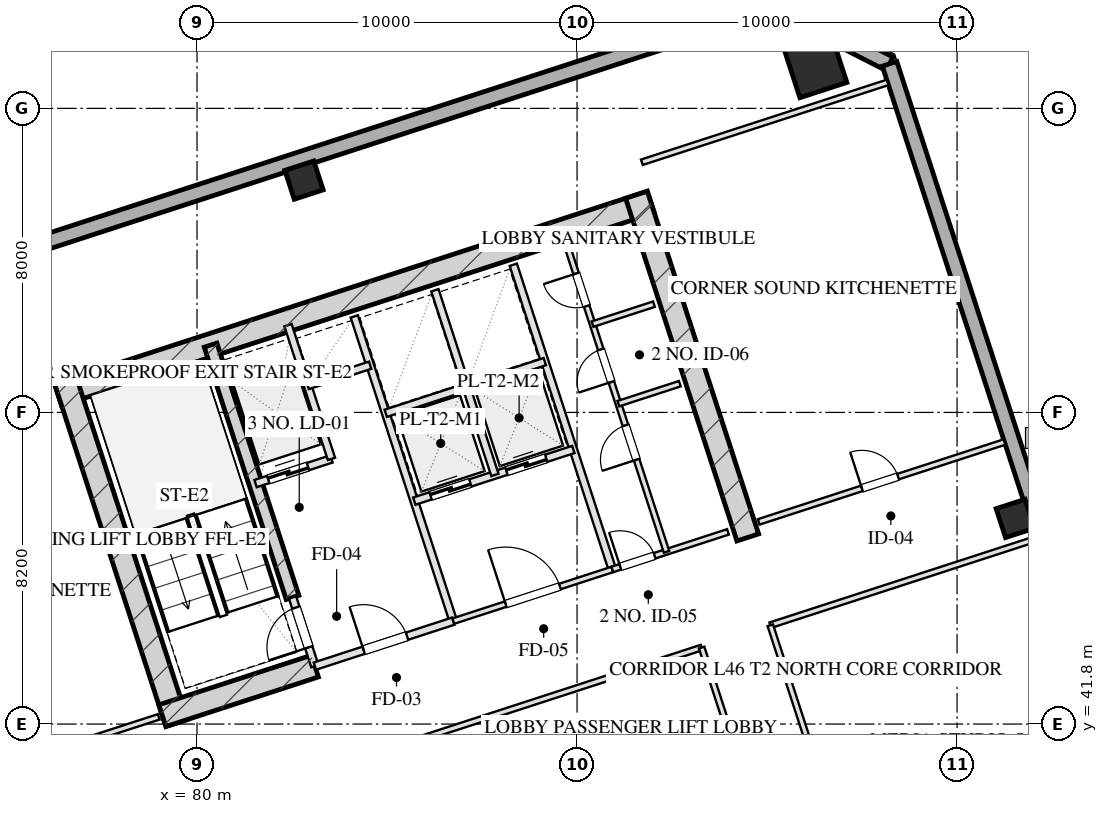
"""IFC4 building model, lengths in metres.
Left out: names, types, materials, properties, quantities, classifications, styles, units other than length and angle.
Written with IfcOpenShell. Run it as: python <this file> out.ifc"""

import sys

from ifc_helpers import new_model, si_unit, direction, frame, frame_2d, origin, origin_2d, place, context, subcontext, project, spatial, rectangle, hollow_rectangle, extrude, element, fill, save


model = new_model("IFC4")
c1 = context("Model", 3, precision=1e-05, world=origin(), true_north=direction((0.0, 1.0)))
c2 = subcontext(c1, "Body", "Model", "MODEL_VIEW")
j1 = project(units=[si_unit("LENGTHUNIT", "METRE"), si_unit("PLANEANGLEUNIT", "RADIAN")], contexts=[c1])
p1 = place(None, origin())
s1 = spatial("IfcSite", under=j1, at=p1, CompositionType="ELEMENT")
p2 = place(p1, origin())
s2 = spatial("IfcBuilding", under=s1, at=p2, CompositionType="ELEMENT")
p3 = place(p2, frame((0.0, 0.0, 173.65)))
s3 = spatial("IfcBuildingStorey", under=s2, at=p3, CompositionType="ELEMENT", Elevation=173.65)
p4 = place(p3, frame((76.344, 50.466, 0.0), z_axis=(0.0, 0.0, 1.0), x_axis=(0.951055727519, 0.309019421968, 0.0)))
e1 = element("IfcWall", 1, at=p4, inside=s3, PredefinedType="SHEAR", context=c2, shape_type="SweptSolid", body=[
    extrude(rectangle(XDim=16.4, YDim=0.6, at=frame_2d((8.2, 0.0))), origin(), (0.0, 0.0, 1.0), 3.45),
])
for number, where, z_axis, x_axis in (
    (2, (79.466, 41.828, 0.0), (0.0, 0.0, 1.0), (-0.309, 0.951, 0.0)),
    (3, (94.492, 46.71, 0.0), (0.0, 0.0, 1.0), (-0.309, 0.951, 0.0)),
):
    element("IfcWall", number, at=place(p3, frame(where, z_axis=z_axis, x_axis=x_axis)), inside=s3, PredefinedType="SHEAR", context=c2, shape_type="SweptSolid", body=[
        extrude(rectangle(XDim=9.48, YDim=0.6, at=frame_2d((4.74, 0.0))), origin(), (0.0, 0.0, 1.0), 3.45),
    ])
p5 = place(p3, frame((82.514, 45.131, 0.0), z_axis=(0.0, 0.0, 1.0), x_axis=(-0.308988790936, 0.951065679686, 0.0)))
e4 = element("IfcWall", 4, at=p5, inside=s3, PredefinedType="SHEAR", context=c2, shape_type="SweptSolid", body=[
    extrude(rectangle(XDim=6.98, YDim=0.35, at=frame_2d((3.49, 0.0))), origin(), (0.0, 0.0, 1.0), 3.45),
])
p6 = place(p3, frame((79.087, 42.021, 0.0), z_axis=(0.0, 0.0, 1.0), x_axis=(0.951062550203, 0.3089984233, 0.0)))
e5 = element("IfcWall", 5, at=p6, inside=s3, PredefinedType="SHEAR", context=c2, shape_type="SweptSolid", body=[
    extrude(rectangle(XDim=4.22, YDim=0.6, at=frame_2d((2.11, 0.0))), origin(), (0.0, 0.0, 1.0), 3.45),
])
p7 = place(p3, frame((96.281, 59.099, 0.0), z_axis=(0.0, 0.0, 1.0), x_axis=(0.951056516295, 0.309016994375, 0.0)))
e6 = element("IfcColumn", 6, at=p7, inside=s3, PredefinedType="COLUMN", context=c2, shape_type="SweptSolid", body=[
    extrude(hollow_rectangle(XDim=1.3, YDim=1.3, WallThickness=0.045, at=origin_2d()), origin(), (0.0, 0.0, 1.0), 3.451),
])
for number, where, z_axis, x_axis in (
    (7, (101.532, 47.21, 0.0), (0.0, 0.0, 1.0), (0.951, 0.309, 0.0)),
    (8, (82.815, 56.112, 0.0), (0.0, 0.0, 1.0), (0.951, 0.309, 0.0)),
):
    element("IfcColumn", number, at=place(p3, frame(where, z_axis=z_axis, x_axis=x_axis)), inside=s3, PredefinedType="COLUMN", context=c2, shape_type="SweptSolid", body=[
        extrude(hollow_rectangle(XDim=0.8, YDim=0.8, WallThickness=0.028, at=origin_2d()), origin(), (0.0, 0.0, 1.0), 3.451),
    ])
p8 = place(p3, frame((81.776, 8.827, 0.0), z_axis=(0.0, 0.0, 1.0), x_axis=(-0.309014228706, 0.951057414911, 0.0)))
e9 = element("IfcWall", 9, at=p8, inside=s3, PredefinedType="SOLIDWALL", context=c2, shape_type="SweptSolid", body=[
    extrude(rectangle(XDim=42.8, YDim=0.4, at=frame_2d((21.4, 0.0))), origin(), (0.0, 0.0, 1.0), 2.61),
])
p9 = place(p8, frame((18.25, 0.0, 0.0)))
e10 = element("IfcOpeningElement", 10, at=p9, cuts=e9, PredefinedType="OPENING", context=c2, shape_type="SweptSolid", body=[
    extrude(rectangle(XDim=1.1, YDim=2.15, at=frame_2d((0.55, 1.075))), frame((0.0, 0.21, 0.0), z_axis=(0.0, -1.0, 0.0), x_axis=(1.0, 0.0, 0.0)), (0.0, 0.0, 1.0), 0.42),
])
p10 = place(p3, frame((70.092, 52.556, 0.0), z_axis=(0.0, 0.0, 1.0), x_axis=(0.951057580055, 0.30901372044, 0.0)))
e11 = element("IfcWall", 11, at=p10, inside=s3, PredefinedType="SOLIDWALL", context=c2, shape_type="SweptSolid", body=[
    extrude(rectangle(XDim=26.4, YDim=0.4, at=frame_2d((13.2, 0.0))), origin(), (0.0, 0.0, 1.0), 2.61),
])
p11 = place(p3, frame((95.199, 60.714, 0.0), z_axis=(0.0, 0.0, 1.0), x_axis=(0.891020832027, -0.453962417932, 0.0)))
e12 = element("IfcWall", 12, at=p11, inside=s3, PredefinedType="SOLIDWALL", context=c2, shape_type="SweptSolid", body=[
    extrude(rectangle(XDim=3.394, YDim=0.4, at=frame_2d((1.697, 0.0))), origin(), (0.0, 0.0, 1.0), 2.61),
])
p12 = place(p3, frame((98.224, 59.173, 0.0), z_axis=(0.0, 0.0, 1.0), x_axis=(0.309014228706, -0.951057414911, 0.0)))
e13 = element("IfcWall", 13, at=p12, inside=s3, PredefinedType="SOLIDWALL", context=c2, shape_type="SweptSolid", body=[
    extrude(rectangle(XDim=42.8, YDim=0.4, at=frame_2d((21.4, 0.0))), origin(), (0.0, 0.0, 1.0), 2.61),
])
p13 = place(p12, frame((17.675, 0.0, 0.75)))
e14 = element("IfcOpeningElement", 14, at=p13, cuts=e13, PredefinedType="OPENING", context=c2, shape_type="SweptSolid", body=[
    extrude(rectangle(XDim=2.25, YDim=1.46, at=frame_2d((1.125, 0.73))), frame((0.0, 0.21, 0.0), z_axis=(0.0, -1.0, 0.0), x_axis=(1.0, 0.0, 0.0)), (0.0, 0.0, 1.0), 0.42),
])
p14 = place(p12, frame((13.875, 0.0, 0.75)))
e15 = element("IfcOpeningElement", 15, at=p14, cuts=e13, PredefinedType="OPENING", context=c2, shape_type="SweptSolid", body=[
    extrude(rectangle(XDim=2.25, YDim=1.46, at=frame_2d((1.125, 0.73))), frame((0.0, 0.21, 0.0), z_axis=(0.0, -1.0, 0.0), x_axis=(1.0, 0.0, 0.0)), (0.0, 0.0, 1.0), 0.42),
])
p15 = place(p12, frame((25.25, 0.0, 0.0)))
e16 = element("IfcOpeningElement", 16, at=p15, cuts=e13, PredefinedType="OPENING", context=c2, shape_type="SweptSolid", body=[
    extrude(rectangle(XDim=1.1, YDim=2.15, at=frame_2d((0.55, 1.075))), frame((0.0, 0.21, 0.0), z_axis=(0.0, -1.0, 0.0), x_axis=(1.0, 0.0, 0.0)), (0.0, 0.0, 1.0), 0.42),
])
p16 = place(p3, frame((83.101, 43.324, 0.0), z_axis=(0.0, 0.0, 1.0), x_axis=(-0.309048298632, 0.951046344356, 0.0)))
e17 = element("IfcWall", 17, at=p16, inside=s3, PredefinedType="PARTITIONING", context=c2, shape_type="SweptSolid", body=[
    extrude(rectangle(XDim=1.9, YDim=0.2, at=frame_2d((0.95, 0.0))), origin(), (0.0, 0.0, 1.0), 3.175),
])
p17 = place(p16, frame((0.52, 0.0, 0.0)))
e18 = element("IfcOpeningElement", 18, at=p17, cuts=e17, PredefinedType="OPENING", context=c2, shape_type="SweptSolid", body=[
    extrude(rectangle(XDim=1.1, YDim=2.05, at=frame_2d((0.55, 1.025))), frame((0.0, 0.11, 0.0), z_axis=(0.0, -1.0, 0.0), x_axis=(1.0, 0.0, 0.0)), (0.0, 0.0, 1.0), 0.22),
])
p18 = place(p3, frame((86.743, 44.508, 0.0), z_axis=(0.0, 0.0, 1.0), x_axis=(-0.309016001439, 0.951056838919, 0.0)))
e19 = element("IfcWall", 19, at=p18, inside=s3, PredefinedType="PARTITIONING", context=c2, shape_type="SweptSolid", body=[
    extrude(rectangle(XDim=8.43, YDim=0.2, at=frame_2d((4.215, 0.0))), origin(), (0.0, 0.0, 1.0), 3.175),
])
p19 = place(p3, frame((83.101, 43.324, 0.0), z_axis=(0.0, 0.0, 1.0), x_axis=(0.951052804469, 0.309028417967, 0.0)))
e20 = element("IfcWall", 20, at=p19, inside=s3, PredefinedType="PARTITIONING", context=c2, shape_type="SweptSolid", body=[
    extrude(rectangle(XDim=3.83, YDim=0.2, at=frame_2d((1.915, 0.0))), origin(), (0.0, 0.0, 1.0), 3.175),
])
p20 = place(p19, frame((1.35, 0.0, 0.0)))
e21 = element("IfcOpeningElement", 21, at=p20, cuts=e20, PredefinedType="OPENING", context=c2, shape_type="SweptSolid", body=[
    extrude(rectangle(XDim=1.2, YDim=2.05, at=frame_2d((0.6, 1.025))), frame((0.0, 0.11, 0.0), z_axis=(0.0, -1.0, 0.0), x_axis=(1.0, 0.0, 0.0)), (0.0, 0.0, 1.0), 0.22),
])
p21 = place(p3, frame((81.54, 48.127, 0.0), z_axis=(0.0, 0.0, 1.0), x_axis=(0.951062257173, 0.308999325213, 0.0)))
e22 = element("IfcWall", 22, at=p21, inside=s3, PredefinedType="PARTITIONING", context=c2, shape_type="SweptSolid", body=[
    extrude(rectangle(XDim=2.1, YDim=0.2, at=frame_2d((1.05, 0.0))), origin(), (0.0, 0.0, 1.0), 3.175),
])
p22 = place(p21, frame((0.35, 0.0, 0.0)))
e23 = element("IfcOpeningElement", 23, at=p22, cuts=e22, PredefinedType="OPENING", context=c2, shape_type="SweptSolid", body=[
    extrude(rectangle(XDim=1.1, YDim=2.05, at=frame_2d((0.55, 1.025))), frame((0.0, 0.11, 0.0), z_axis=(0.0, -1.0, 0.0), x_axis=(1.0, 0.0, 0.0)), (0.0, 0.0, 1.0), 0.22),
])
p23 = place(p3, frame((83.538, 48.776, 0.0), z_axis=(0.0, 0.0, 1.0), x_axis=(-0.3089935693, 0.951064127245, 0.0)))
e24 = element("IfcWall", 24, at=p23, inside=s3, PredefinedType="PARTITIONING", context=c2, shape_type="SweptSolid", body=[
    extrude(rectangle(XDim=3.7, YDim=0.2, at=frame_2d((1.85, 0.0))), origin(), (0.0, 0.0, 1.0), 3.175),
])
p24 = place(p3, frame((82.91, 50.707, 0.0), z_axis=(0.0, 0.0, 1.0), x_axis=(0.951041328149, 0.309063734775, 0.0)))
e25 = element("IfcWall", 25, at=p24, inside=s3, PredefinedType="PARTITIONING", context=c2, shape_type="SweptSolid", body=[
    extrude(rectangle(XDim=1.73, YDim=0.2, at=frame_2d((0.865, 0.0))), origin(), (0.0, 0.0, 1.0), 3.175),
])
p25 = place(p3, frame((90.928, 45.868, 0.0), z_axis=(0.0, 0.0, 1.0), x_axis=(-0.309042196757, 0.951048327176, 0.0)))
e26 = element("IfcWall", 26, at=p25, inside=s3, PredefinedType="PARTITIONING", context=c2, shape_type="SweptSolid", body=[
    extrude(rectangle(XDim=8.43, YDim=0.2, at=frame_2d((4.215, 0.0))), origin(), (0.0, 0.0, 1.0), 3.175),
])
p26 = place(p3, frame((86.743, 44.508, 0.0), z_axis=(0.0, 0.0, 1.0), x_axis=(0.951063829732, 0.308994485023, 0.0)))
e27 = element("IfcWall", 27, at=p26, inside=s3, PredefinedType="PARTITIONING", context=c2, shape_type="SweptSolid", body=[
    extrude(rectangle(XDim=4.4, YDim=0.15, at=frame_2d((2.2, 0.0))), origin(), (0.0, 0.0, 1.0), 3.175),
])
p27 = place(p26, frame((1.45, 0.0, 0.0)))
e28 = element("IfcOpeningElement", 28, at=p27, cuts=e27, PredefinedType="OPENING", context=c2, shape_type="SweptSolid", body=[
    extrude(rectangle(XDim=1.5, YDim=2.05, at=frame_2d((0.75, 1.025))), frame((0.0, 0.085, 0.0), z_axis=(0.0, -1.0, 0.0), x_axis=(1.0, 0.0, 0.0)), (0.0, 0.0, 1.0), 0.17),
])
p28 = place(p3, frame((85.718, 47.666, 0.0), z_axis=(0.0, 0.0, 1.0), x_axis=(0.951058531764, 0.30901079133, 0.0)))
e29 = element("IfcWall", 29, at=p28, inside=s3, PredefinedType="PARTITIONING", context=c2, shape_type="SweptSolid", body=[
    extrude(rectangle(XDim=4.4, YDim=0.2, at=frame_2d((2.2, 0.0))), origin(), (0.0, 0.0, 1.0), 3.175),
])
p29 = place(p28, frame((0.45, 0.0, 0.0)))
e30 = element("IfcOpeningElement", 30, at=p29, cuts=e29, PredefinedType="OPENING", context=c2, shape_type="SweptSolid", body=[
    extrude(rectangle(XDim=1.1, YDim=2.05, at=frame_2d((0.55, 1.025))), frame((0.0, 0.11, 0.0), z_axis=(0.0, -1.0, 0.0), x_axis=(1.0, 0.0, 0.0)), (0.0, 0.0, 1.0), 0.22),
])
p30 = place(p28, frame((2.55, 0.0, 0.0)))
e31 = element("IfcOpeningElement", 31, at=p30, cuts=e29, PredefinedType="OPENING", context=c2, shape_type="SweptSolid", body=[
    extrude(rectangle(XDim=1.1, YDim=2.05, at=frame_2d((0.55, 1.025))), frame((0.0, 0.11, 0.0), z_axis=(0.0, -1.0, 0.0), x_axis=(1.0, 0.0, 0.0)), (0.0, 0.0, 1.0), 0.22),
])
p31 = place(p3, frame((87.838, 48.354, 0.0), z_axis=(0.0, 0.0, 1.0), x_axis=(-0.3090093719, 0.951058992953, 0.0)))
e32 = element("IfcWall", 32, at=p31, inside=s3, PredefinedType="PARTITIONING", context=c2, shape_type="SweptSolid", body=[
    extrude(rectangle(XDim=5.11, YDim=0.2, at=frame_2d((2.555, 0.0))), origin(), (0.0, 0.0, 1.0), 3.175),
])
p32 = place(p3, frame((84.967, 49.977, 0.0), z_axis=(0.0, 0.0, 1.0), x_axis=(0.951063829732, 0.308994485023, 0.0)))
e33 = element("IfcWall", 33, at=p32, inside=s3, PredefinedType="PARTITIONING", context=c2, shape_type="SweptSolid", body=[
    extrude(rectangle(XDim=4.4, YDim=0.2, at=frame_2d((2.2, 0.0))), origin(), (0.0, 0.0, 1.0), 3.175),
])
p33 = place(p3, frame((90.928, 45.868, 0.0), z_axis=(0.0, 0.0, 1.0), x_axis=(0.951059297078, 0.309008435874, 0.0)))
e34 = element("IfcWall", 34, at=p33, inside=s3, PredefinedType="PARTITIONING", context=c2, shape_type="SweptSolid", body=[
    extrude(rectangle(XDim=3.2, YDim=0.15, at=frame_2d((1.6, 0.0))), origin(), (0.0, 0.0, 1.0), 3.175),
])
p34 = place(p33, frame((0.22, 0.0, 0.0)))
e35 = element("IfcOpeningElement", 35, at=p34, cuts=e34, PredefinedType="OPENING", context=c2, shape_type="SweptSolid", body=[
    extrude(rectangle(XDim=0.95, YDim=2.05, at=frame_2d((0.475, 1.025))), frame((0.0, 0.085, 0.0), z_axis=(0.0, -1.0, 0.0), x_axis=(1.0, 0.0, 0.0)), (0.0, 0.0, 1.0), 0.17),
])
p35 = place(p3, frame((92.355, 46.331, 0.0), z_axis=(0.0, 0.0, 1.0), x_axis=(-0.309007490203, 0.951059604335, 0.0)))
e36 = element("IfcWall", 36, at=p35, inside=s3, PredefinedType="PARTITIONING", context=c2, shape_type="SweptSolid", body=[
    extrude(rectangle(XDim=8.43, YDim=0.15, at=frame_2d((4.215, 0.0))), origin(), (0.0, 0.0, 1.0), 3.175),
])
p36 = place(p35, frame((2.55, 0.0, 0.0)))
e37 = element("IfcOpeningElement", 37, at=p36, cuts=e36, PredefinedType="OPENING", context=c2, shape_type="SweptSolid", body=[
    extrude(rectangle(XDim=0.95, YDim=2.05, at=frame_2d((0.475, 1.025))), frame((0.0, 0.085, 0.0), z_axis=(0.0, -1.0, 0.0), x_axis=(1.0, 0.0, 0.0)), (0.0, 0.0, 1.0), 0.17),
])
p37 = place(p35, frame((4.7, 0.0, 0.0)))
e38 = element("IfcOpeningElement", 38, at=p37, cuts=e36, PredefinedType="OPENING", context=c2, shape_type="SweptSolid", body=[
    extrude(rectangle(XDim=0.9, YDim=2.05, at=frame_2d((0.45, 1.025))), frame((0.0, 0.085, 0.0), z_axis=(0.0, -1.0, 0.0), x_axis=(1.0, 0.0, 0.0)), (0.0, 0.0, 1.0), 0.17),
])
p38 = place(p35, frame((6.8, 0.0, 0.0)))
e39 = element("IfcOpeningElement", 39, at=p38, cuts=e36, PredefinedType="OPENING", context=c2, shape_type="SweptSolid", body=[
    extrude(rectangle(XDim=0.9, YDim=2.05, at=frame_2d((0.45, 1.025))), frame((0.0, 0.085, 0.0), z_axis=(0.0, -1.0, 0.0), x_axis=(1.0, 0.0, 0.0)), (0.0, 0.0, 1.0), 0.17),
])
p39 = place(p3, frame((91.088, 50.23, 0.0), z_axis=(0.0, 0.0, 1.0), x_axis=(0.951054116971, 0.309024378638, 0.0)))
e40 = element("IfcWall", 40, at=p39, inside=s3, PredefinedType="PARTITIONING", context=c2, shape_type="SweptSolid", body=[
    extrude(rectangle(XDim=1.7, YDim=0.15, at=frame_2d((0.85, 0.0))), origin(), (0.0, 0.0, 1.0), 3.175),
])
p40 = place(p3, frame((90.408, 52.323, 0.0), z_axis=(0.0, 0.0, 1.0), x_axis=(0.951040401051, 0.309066587596, 0.0)))
e41 = element("IfcWall", 41, at=p40, inside=s3, PredefinedType="PARTITIONING", context=c2, shape_type="SweptSolid", body=[
    extrude(rectangle(XDim=1.7, YDim=0.15, at=frame_2d((0.85, 0.0))), origin(), (0.0, 0.0, 1.0), 3.175),
])
p41 = place(p3, frame((71.955, 39.703, 0.0), z_axis=(0.0, 0.0, 1.0), x_axis=(0.951060977215, 0.309003264738, 0.0)))
e42 = element("IfcWall", 42, at=p41, inside=s3, PredefinedType="PARTITIONING", context=c2, shape_type="SweptSolid", body=[
    extrude(rectangle(XDim=7.4, YDim=0.15, at=frame_2d((3.7, 0.0))), origin(), (0.0, 0.0, 1.0), 3.175),
])
p42 = place(p41, frame((3.108, 0.0, 0.0)))
e43 = element("IfcOpeningElement", 43, at=p42, cuts=e42, PredefinedType="OPENING", context=c2, shape_type="SweptSolid", body=[
    extrude(rectangle(XDim=1.0, YDim=2.05, at=frame_2d((0.5, 1.025))), frame((0.0, 0.085, 0.0), z_axis=(0.0, -1.0, 0.0), x_axis=(1.0, 0.0, 0.0)), (0.0, 0.0, 1.0), 0.17),
])
p43 = place(p3, frame((91.705, 56.582, 0.0), z_axis=(0.0, 0.0, 1.0), x_axis=(0.951057811516, 0.309013008068, 0.0)))
e44 = element("IfcWall", 44, at=p43, inside=s3, PredefinedType="PARTITIONING", context=c2, shape_type="SweptSolid", body=[
    extrude(rectangle(XDim=6.8, YDim=0.15, at=frame_2d((3.4, 0.0))), origin(), (0.0, 0.0, 1.0), 3.175),
])
p44 = place(p3, frame((94.78, 47.119, 0.0), z_axis=(0.0, 0.0, 1.0), x_axis=(0.951057811516, 0.309013008068, 0.0)))
e45 = element("IfcWall", 45, at=p44, inside=s3, PredefinedType="PARTITIONING", context=c2, shape_type="SweptSolid", body=[
    extrude(rectangle(XDim=6.8, YDim=0.15, at=frame_2d((3.4, 0.0))), origin(), (0.0, 0.0, 1.0), 3.175),
])
p45 = place(p44, frame((2.856, 0.0, 0.0)))
e46 = element("IfcOpeningElement", 46, at=p45, cuts=e45, PredefinedType="OPENING", context=c2, shape_type="SweptSolid", body=[
    extrude(rectangle(XDim=1.0, YDim=2.05, at=frame_2d((0.5, 1.025))), frame((0.0, 0.085, 0.0), z_axis=(0.0, -1.0, 0.0), x_axis=(1.0, 0.0, 0.0)), (0.0, 0.0, 1.0), 0.17),
])
p46 = place(p3, frame((85.527, 41.295, 0.0), z_axis=(0.0, 0.0, 1.0), x_axis=(0.951055419664, 0.309020369437, 0.0)))
e47 = element("IfcWall", 47, at=p46, inside=s3, PredefinedType="PARTITIONING", context=c2, shape_type="SweptSolid", body=[
    extrude(rectangle(XDim=8.15, YDim=0.15, at=frame_2d((4.075, 0.0))), origin(), (0.0, 0.0, 1.0), 3.175),
])
p47 = place(p3, frame((95.085, 44.4, 0.0), z_axis=(0.0, 0.0, 1.0), x_axis=(0.95105749975, 0.309013967595, 0.0)))
e48 = element("IfcWall", 48, at=p47, inside=s3, PredefinedType="PARTITIONING", context=c2, shape_type="SweptSolid", body=[
    extrude(rectangle(XDim=7.35, YDim=0.15, at=frame_2d((3.675, 0.0))), origin(), (0.0, 0.0, 1.0), 3.175),
])
p48 = place(p3, frame((98.42, 27.988, 0.0), z_axis=(0.0, 0.0, 1.0), x_axis=(-0.309004459387, 0.951060589068, 0.0)))
e49 = element("IfcWall", 49, at=p48, inside=s3, PredefinedType="PARTITIONING", context=c2, shape_type="SweptSolid", body=[
    extrude(rectangle(XDim=16.64, YDim=0.15, at=frame_2d((8.32, 0.0))), origin(), (0.0, 0.0, 1.0), 3.175),
])
p49 = place(p48, frame((7.68, 0.0, 0.0)))
e50 = element("IfcOpeningElement", 50, at=p49, cuts=e49, PredefinedType="OPENING", context=c2, shape_type="SweptSolid", body=[
    extrude(rectangle(XDim=1.1, YDim=2.05, at=frame_2d((0.55, 1.025))), frame((0.0, 0.085, 0.0), z_axis=(0.0, -1.0, 0.0), x_axis=(1.0, 0.0, 0.0)), (0.0, 0.0, 1.0), 0.17),
])
p50 = place(p3, frame((100.227, 28.575, 0.0), z_axis=(0.0, 0.0, 1.0), x_axis=(-0.30901773025, 0.951056277195, 0.0)))
e51 = element("IfcWall", 51, at=p50, inside=s3, PredefinedType="PARTITIONING", context=c2, shape_type="SweptSolid", body=[
    extrude(rectangle(XDim=16.64, YDim=0.15, at=frame_2d((8.32, 0.0))), origin(), (0.0, 0.0, 1.0), 3.175),
])
p51 = place(p50, frame((3.32, 0.0, 0.0)))
e52 = element("IfcOpeningElement", 52, at=p51, cuts=e51, PredefinedType="OPENING", context=c2, shape_type="SweptSolid", body=[
    extrude(rectangle(XDim=1.0, YDim=2.05, at=frame_2d((0.5, 1.025))), frame((0.0, 0.085, 0.0), z_axis=(0.0, -1.0, 0.0), x_axis=(1.0, 0.0, 0.0)), (0.0, 0.0, 1.0), 0.17),
])
p52 = place(p50, frame((11.64, 0.0, 0.0)))
e53 = element("IfcOpeningElement", 53, at=p52, cuts=e51, PredefinedType="OPENING", context=c2, shape_type="SweptSolid", body=[
    extrude(rectangle(XDim=1.0, YDim=2.05, at=frame_2d((0.5, 1.025))), frame((0.0, 0.085, 0.0), z_axis=(0.0, -1.0, 0.0), x_axis=(1.0, 0.0, 0.0)), (0.0, 0.0, 1.0), 0.17),
])
p53 = place(p17, origin())
e54 = element("IfcDoor", 54, at=p53, inside=s3, OperationType="SINGLE_SWING_LEFT", PredefinedType="DOOR", context=c2, shape_type="SweptSolid", body=[
    extrude(rectangle(XDim=1.1, YDim=2.05, at=frame_2d((0.55, 1.025))), frame((0.0, 0.025, 0.0), z_axis=(0.0, -1.0, 0.0), x_axis=(1.0, 0.0, 0.0)), (0.0, 0.0, 1.0), 0.05),
])
fill(e18, e54)
p54 = place(p20, origin())
e55 = element("IfcDoor", 55, at=p54, inside=s3, OperationType="SINGLE_SWING_LEFT", PredefinedType="DOOR", context=c2, shape_type="SweptSolid", body=[
    extrude(rectangle(XDim=1.2, YDim=2.05, at=frame_2d((0.6, 1.025))), frame((0.0, 0.025, 0.0), z_axis=(0.0, -1.0, 0.0), x_axis=(1.0, 0.0, 0.0)), (0.0, 0.0, 1.0), 0.05),
])
fill(e21, e55)
p55 = place(p22, origin())
e56 = element("IfcDoor", 56, at=p55, inside=s3, OperationType="DOUBLE_DOOR_SLIDING", PredefinedType="DOOR", context=c2, shape_type="SweptSolid", body=[
    extrude(rectangle(XDim=1.1, YDim=2.05, at=frame_2d((0.55, 1.025))), frame((0.0, 0.025, 0.0), z_axis=(0.0, -1.0, 0.0), x_axis=(1.0, 0.0, 0.0)), (0.0, 0.0, 1.0), 0.05),
])
fill(e23, e56)
p56 = place(p27, origin())
e57 = element("IfcDoor", 57, at=p56, inside=s3, OperationType="SINGLE_SWING_LEFT", PredefinedType="DOOR", context=c2, shape_type="SweptSolid", body=[
    extrude(rectangle(XDim=1.5, YDim=2.05, at=frame_2d((0.75, 1.025))), frame((0.0, 0.025, 0.0), z_axis=(0.0, -1.0, 0.0), x_axis=(1.0, 0.0, 0.0)), (0.0, 0.0, 1.0), 0.05),
])
fill(e28, e57)
p57 = place(p29, origin())
e58 = element("IfcDoor", 58, at=p57, inside=s3, OperationType="DOUBLE_DOOR_SLIDING", PredefinedType="DOOR", context=c2, shape_type="SweptSolid", body=[
    extrude(rectangle(XDim=1.1, YDim=2.05, at=frame_2d((0.55, 1.025))), frame((0.0, 0.025, 0.0), z_axis=(0.0, -1.0, 0.0), x_axis=(1.0, 0.0, 0.0)), (0.0, 0.0, 1.0), 0.05),
])
fill(e30, e58)
p58 = place(p30, origin())
e59 = element("IfcDoor", 59, at=p58, inside=s3, OperationType="DOUBLE_DOOR_SLIDING", PredefinedType="DOOR", context=c2, shape_type="SweptSolid", body=[
    extrude(rectangle(XDim=1.1, YDim=2.05, at=frame_2d((0.55, 1.025))), frame((0.0, 0.025, 0.0), z_axis=(0.0, -1.0, 0.0), x_axis=(1.0, 0.0, 0.0)), (0.0, 0.0, 1.0), 0.05),
])
fill(e31, e59)
p59 = place(p34, origin())
e60 = element("IfcDoor", 60, at=p59, inside=s3, OperationType="SINGLE_SWING_LEFT", PredefinedType="DOOR", context=c2, shape_type="SweptSolid", body=[
    extrude(rectangle(XDim=0.95, YDim=2.05, at=frame_2d((0.475, 1.025))), frame((0.0, 0.025, 0.0), z_axis=(0.0, -1.0, 0.0), x_axis=(1.0, 0.0, 0.0)), (0.0, 0.0, 1.0), 0.05),
])
fill(e35, e60)
p60 = place(p36, origin())
e61 = element("IfcDoor", 61, at=p60, inside=s3, OperationType="SINGLE_SWING_LEFT", PredefinedType="DOOR", context=c2, shape_type="SweptSolid", body=[
    extrude(rectangle(XDim=0.95, YDim=2.05, at=frame_2d((0.475, 1.025))), frame((0.0, 0.025, 0.0), z_axis=(0.0, -1.0, 0.0), x_axis=(1.0, 0.0, 0.0)), (0.0, 0.0, 1.0), 0.05),
])
fill(e37, e61)
p61 = place(p37, origin())
e62 = element("IfcDoor", 62, at=p61, inside=s3, OperationType="SINGLE_SWING_LEFT", PredefinedType="DOOR", context=c2, shape_type="SweptSolid", body=[
    extrude(rectangle(XDim=0.9, YDim=2.05, at=frame_2d((0.45, 1.025))), frame((0.0, 0.025, 0.0), z_axis=(0.0, -1.0, 0.0), x_axis=(1.0, 0.0, 0.0)), (0.0, 0.0, 1.0), 0.05),
])
fill(e38, e62)
p62 = place(p38, origin())
e63 = element("IfcDoor", 63, at=p62, inside=s3, OperationType="SINGLE_SWING_RIGHT", PredefinedType="DOOR", context=c2, shape_type="SweptSolid", body=[
    extrude(rectangle(XDim=0.9, YDim=2.05, at=frame_2d((0.45, 1.025))), frame((0.0, 0.025, 0.0), z_axis=(0.0, -1.0, 0.0), x_axis=(1.0, 0.0, 0.0)), (0.0, 0.0, 1.0), 0.05),
])
fill(e39, e63)
p63 = place(p45, origin())
e64 = element("IfcDoor", 64, at=p63, inside=s3, OperationType="SINGLE_SWING_LEFT", PredefinedType="DOOR", context=c2, shape_type="SweptSolid", body=[
    extrude(rectangle(XDim=1.0, YDim=2.05, at=frame_2d((0.5, 1.025))), frame((0.0, 0.025, 0.0), z_axis=(0.0, -1.0, 0.0), x_axis=(1.0, 0.0, 0.0)), (0.0, 0.0, 1.0), 0.05),
])
fill(e46, e64)
save(model, sys.argv[1])
